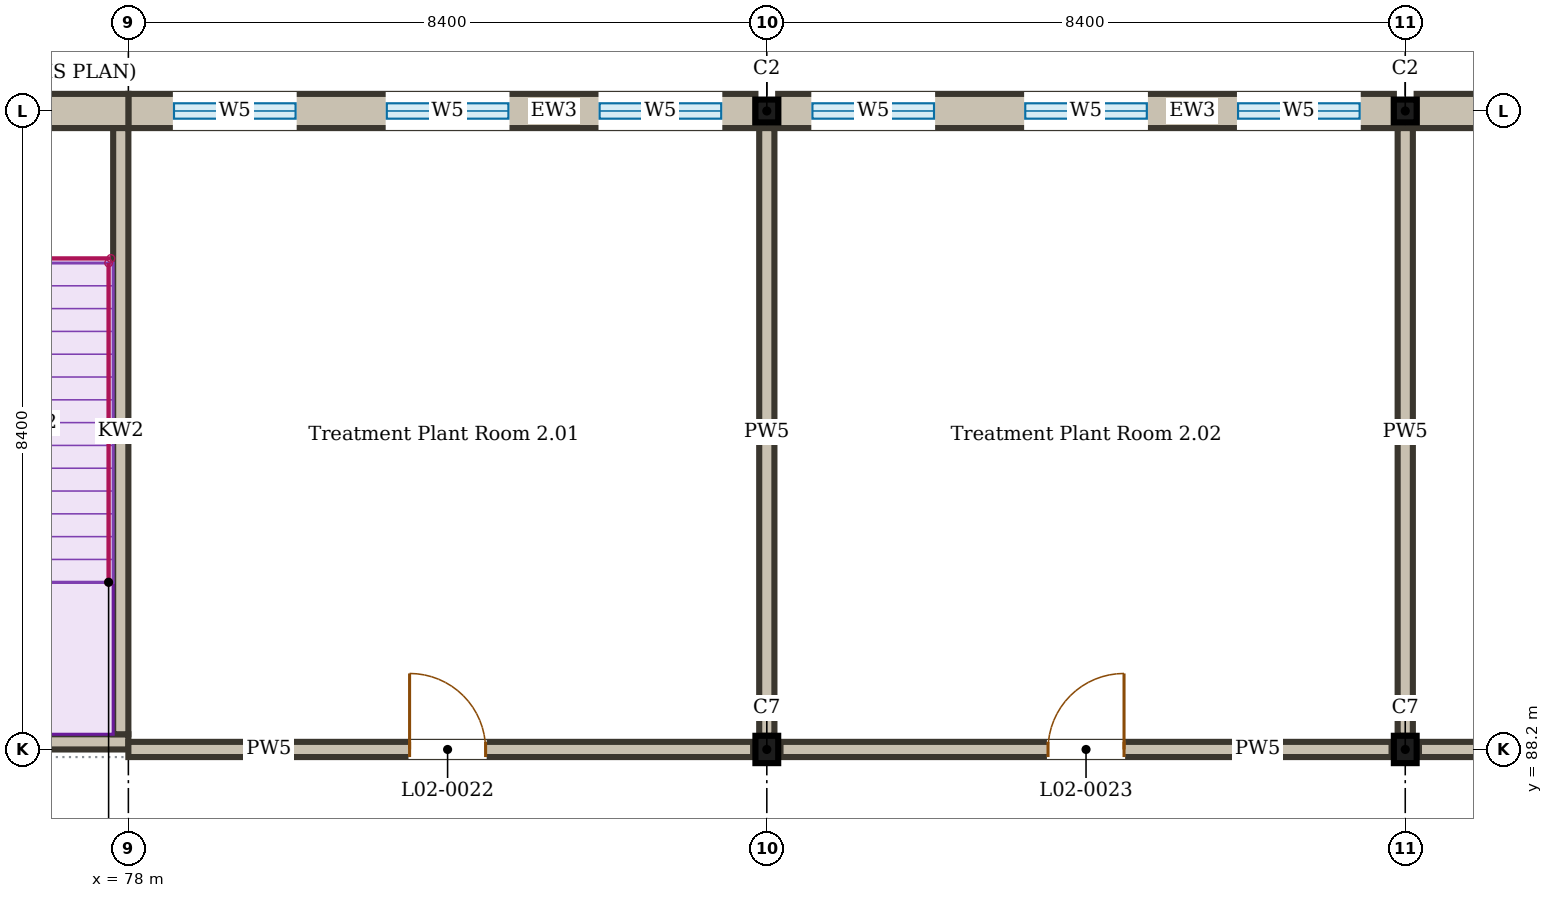
"""IFC4 building model, lengths in metres.
Left out: names, types, materials, properties, quantities, classifications, styles, units other than length and angle.
Written with IfcOpenShell. Run it as: python <this file> out.ifc"""

import sys

from ifc_helpers import new_model, si_unit, direction, frame, frame_2d, origin, origin_2d, place, context, subcontext, project, spatial, rectangle, i_section, extrude, element, fill, save


model = new_model("IFC4")
c1 = context("Model", 3, precision=1e-05, world=origin(), true_north=direction((0.0, 1.0)))
c2 = subcontext(c1, "Body", "Model", "MODEL_VIEW")
j1 = project(units=[si_unit("LENGTHUNIT", "METRE"), si_unit("PLANEANGLEUNIT", "RADIAN")], contexts=[c1])
p1 = place(None, origin())
s1 = spatial("IfcSite", under=j1, at=p1, CompositionType="ELEMENT")
p2 = place(p1, origin())
s2 = spatial("IfcBuilding", under=s1, at=p2, CompositionType="ELEMENT")
p3 = place(p2, frame((0.0, 0.0, 9.0)))
s3 = spatial("IfcBuildingStorey", under=s2, at=p3, CompositionType="ELEMENT", Elevation=9.0)
for number, where, z_axis, x_axis in (
    (1, (86.4, 88.2, 0.0), (0.0, 0.0, 1.0), (1.0, 0.0, 0.0)),
    (2, (94.8, 88.2, 0.0), (0.0, 0.0, 1.0), (1.0, 0.0, 0.0)),
):
    element("IfcColumn", number, at=place(p3, frame(where, z_axis=z_axis, x_axis=x_axis)), inside=s3, PredefinedType="COLUMN", context=c2, shape_type="SweptSolid", body=[
        extrude(i_section(OverallWidth=0.3, OverallDepth=0.36, WebThickness=0.012, FlangeThickness=0.022, FilletRadius=0.027, at=origin_2d()), origin(), (0.0, 0.0, 1.0), 4.5),
    ])
for number, where, z_axis, x_axis in (
    (3, (86.4, 96.6, 0.0), (0.0, 0.0, 1.0), (1.0, 0.0, 0.0)),
    (4, (94.8, 96.6, 0.0), (0.0, 0.0, 1.0), (1.0, 0.0, 0.0)),
):
    element("IfcColumn", number, at=place(p3, frame(where, z_axis=z_axis, x_axis=x_axis)), inside=s3, PredefinedType="COLUMN", context=c2, shape_type="SweptSolid", body=[
        extrude(i_section(OverallWidth=0.3, OverallDepth=0.3, WebThickness=0.011, FlangeThickness=0.019, FilletRadius=0.027, at=origin_2d()), origin(), (0.0, 0.0, 1.0), 4.5),
    ])
p4 = place(p3, frame((78.0, 96.6, 0.0), z_axis=(0.0, 0.0, 1.0), x_axis=(1.0, 0.0, 0.0)))
e5 = element("IfcWall", 5, at=p4, inside=s3, PredefinedType="SOLIDWALL", context=c2, shape_type="SweptSolid", body=[
    extrude(rectangle(XDim=8.25, YDim=0.45, at=frame_2d((4.125, 0.0))), origin(), (0.0, 0.0, 1.0), 3.886),
])
p5 = place(p4, frame((0.6, 0.0, 0.9)))
e6 = element("IfcOpeningElement", 6, at=p5, cuts=e5, PredefinedType="OPENING", context=c2, shape_type="SweptSolid", body=[
    extrude(rectangle(XDim=1.6, YDim=1.2, at=frame_2d((0.8, 0.6))), frame((0.0, 0.235, 0.0), z_axis=(0.0, -1.0, 0.0), x_axis=(1.0, 0.0, 0.0)), (0.0, 0.0, 1.0), 0.47),
])
p6 = place(p4, frame((3.4, 0.0, 0.9)))
e7 = element("IfcOpeningElement", 7, at=p6, cuts=e5, PredefinedType="OPENING", context=c2, shape_type="SweptSolid", body=[
    extrude(rectangle(XDim=1.6, YDim=1.2, at=frame_2d((0.8, 0.6))), frame((0.0, 0.235, 0.0), z_axis=(0.0, -1.0, 0.0), x_axis=(1.0, 0.0, 0.0)), (0.0, 0.0, 1.0), 0.47),
])
p7 = place(p4, frame((6.2, 0.0, 0.9)))
e8 = element("IfcOpeningElement", 8, at=p7, cuts=e5, PredefinedType="OPENING", context=c2, shape_type="SweptSolid", body=[
    extrude(rectangle(XDim=1.6, YDim=1.2, at=frame_2d((0.8, 0.6))), frame((0.0, 0.235, 0.0), z_axis=(0.0, -1.0, 0.0), x_axis=(1.0, 0.0, 0.0)), (0.0, 0.0, 1.0), 0.47),
])
p8 = place(p3, frame((86.55, 96.6, 0.0), z_axis=(0.0, 0.0, 1.0), x_axis=(1.0, 0.0, 0.0)))
e9 = element("IfcWall", 9, at=p8, inside=s3, PredefinedType="SOLIDWALL", context=c2, shape_type="SweptSolid", body=[
    extrude(rectangle(XDim=8.1, YDim=0.45, at=frame_2d((4.05, 0.0))), origin(), (0.0, 0.0, 1.0), 3.886),
])
p9 = place(p8, frame((0.45, 0.0, 0.9)))
e10 = element("IfcOpeningElement", 10, at=p9, cuts=e9, PredefinedType="OPENING", context=c2, shape_type="SweptSolid", body=[
    extrude(rectangle(XDim=1.6, YDim=1.2, at=frame_2d((0.8, 0.6))), frame((0.0, 0.235, 0.0), z_axis=(0.0, -1.0, 0.0), x_axis=(1.0, 0.0, 0.0)), (0.0, 0.0, 1.0), 0.47),
])
p10 = place(p8, frame((3.25, 0.0, 0.9)))
e11 = element("IfcOpeningElement", 11, at=p10, cuts=e9, PredefinedType="OPENING", context=c2, shape_type="SweptSolid", body=[
    extrude(rectangle(XDim=1.6, YDim=1.2, at=frame_2d((0.8, 0.6))), frame((0.0, 0.235, 0.0), z_axis=(0.0, -1.0, 0.0), x_axis=(1.0, 0.0, 0.0)), (0.0, 0.0, 1.0), 0.47),
])
p11 = place(p8, frame((6.05, 0.0, 0.9)))
e12 = element("IfcOpeningElement", 12, at=p11, cuts=e9, PredefinedType="OPENING", context=c2, shape_type="SweptSolid", body=[
    extrude(rectangle(XDim=1.6, YDim=1.2, at=frame_2d((0.8, 0.6))), frame((0.0, 0.235, 0.0), z_axis=(0.0, -1.0, 0.0), x_axis=(1.0, 0.0, 0.0)), (0.0, 0.0, 1.0), 0.47),
])
p12 = place(p3, frame((94.95, 96.6, 0.0), z_axis=(0.0, 0.0, 1.0), x_axis=(1.0, 0.0, 0.0)))
e13 = element("IfcWall", 13, at=p12, inside=s3, PredefinedType="SOLIDWALL", context=c2, shape_type="SweptSolid", body=[
    extrude(rectangle(XDim=8.25, YDim=0.45, at=frame_2d((4.125, 0.0))), origin(), (0.0, 0.0, 1.0), 3.886),
])
p13 = place(p3, frame((78.0, 88.2, 0.0), z_axis=(0.0, 0.0, 1.0), x_axis=(1.0, 0.0, 0.0)))
e14 = element("IfcWall", 14, at=p13, inside=s3, PredefinedType="SOLIDWALL", context=c2, shape_type="SweptSolid", body=[
    extrude(rectangle(XDim=8.22, YDim=0.2, at=frame_2d((4.11, 0.0))), origin(), (0.0, 0.0, 1.0), 3.9),
])
p14 = place(p13, frame((3.7, 0.0, 0.0)))
e15 = element("IfcOpeningElement", 15, at=p14, cuts=e14, PredefinedType="OPENING", context=c2, shape_type="SweptSolid", body=[
    extrude(rectangle(XDim=1.0, YDim=2.1, at=frame_2d((0.5, 1.05))), frame((0.0, 0.11, 0.0), z_axis=(0.0, -1.0, 0.0), x_axis=(1.0, 0.0, 0.0)), (0.0, 0.0, 1.0), 0.22),
])
p15 = place(p3, frame((86.58, 88.2, 0.0), z_axis=(0.0, 0.0, 1.0), x_axis=(1.0, 0.0, 0.0)))
e16 = element("IfcWall", 16, at=p15, inside=s3, PredefinedType="SOLIDWALL", context=c2, shape_type="SweptSolid", body=[
    extrude(rectangle(XDim=8.04, YDim=0.2, at=frame_2d((4.02, 0.0))), origin(), (0.0, 0.0, 1.0), 3.9),
])
p16 = place(p15, frame((3.52, 0.0, 0.0)))
e17 = element("IfcOpeningElement", 17, at=p16, cuts=e16, PredefinedType="OPENING", context=c2, shape_type="SweptSolid", body=[
    extrude(rectangle(XDim=1.0, YDim=2.1, at=frame_2d((0.5, 1.05))), frame((0.0, 0.11, 0.0), z_axis=(0.0, -1.0, 0.0), x_axis=(1.0, 0.0, 0.0)), (0.0, 0.0, 1.0), 0.22),
])
p17 = place(p3, frame((94.98, 88.2, 0.0), z_axis=(0.0, 0.0, 1.0), x_axis=(1.0, 0.0, 0.0)))
e18 = element("IfcWall", 18, at=p17, inside=s3, PredefinedType="SOLIDWALL", context=c2, shape_type="SweptSolid", body=[
    extrude(rectangle(XDim=8.22, YDim=0.2, at=frame_2d((4.11, 0.0))), origin(), (0.0, 0.0, 1.0), 3.9),
])
p18 = place(p17, frame((3.52, 0.0, 0.0)))
e19 = element("IfcOpeningElement", 19, at=p18, cuts=e18, PredefinedType="OPENING", context=c2, shape_type="SweptSolid", body=[
    extrude(rectangle(XDim=1.0, YDim=2.1, at=frame_2d((0.5, 1.05))), frame((0.0, 0.11, 0.0), z_axis=(0.0, -1.0, 0.0), x_axis=(1.0, 0.0, 0.0)), (0.0, 0.0, 1.0), 0.22),
])
for number, where, z_axis, x_axis in (
    (20, (86.4, 88.38, 0.0), (0.0, 0.0, 1.0), (0.0, 1.0, 0.0)),
    (21, (94.8, 88.38, 0.0), (0.0, 0.0, 1.0), (0.0, 1.0, 0.0)),
):
    element("IfcWall", number, at=place(p3, frame(where, z_axis=z_axis, x_axis=x_axis)), inside=s3, PredefinedType="SOLIDWALL", context=c2, shape_type="SweptSolid", body=[
        extrude(rectangle(XDim=7.995, YDim=0.2, at=frame_2d((3.998, 0.0))), origin(), (0.0, 0.0, 1.0), 3.9),
    ])
p19 = place(p3, frame((78.0, 88.3, 0.0), z_axis=(0.0, 0.0, 1.0), x_axis=(-1.0, 0.0, 0.0)))
e22 = element("IfcWall", 22, at=p19, inside=s3, PredefinedType="SOLIDWALL", context=c2, shape_type="SweptSolid", body=[
    extrude(rectangle(XDim=8.4, YDim=0.2, at=frame_2d((4.2, 0.0))), origin(), (0.0, 0.0, 1.0), 4.5),
])
p20 = place(p19, frame((4.725, 0.0, 0.0)))
e23 = element("IfcOpeningElement", 23, at=p20, cuts=e22, PredefinedType="OPENING", context=c2, shape_type="SweptSolid", body=[
    extrude(rectangle(XDim=1.3, YDim=2.1, at=frame_2d((0.65, 1.05))), frame((0.0, 0.11, 0.0), z_axis=(0.0, -1.0, 0.0), x_axis=(1.0, 0.0, 0.0)), (0.0, 0.0, 1.0), 0.22),
])
p21 = place(p3, frame((78.0, 96.6, 0.0), z_axis=(0.0, 0.0, 1.0), x_axis=(-1.0, 0.0, 0.0)))
e24 = element("IfcWall", 24, at=p21, inside=s3, PredefinedType="SOLIDWALL", context=c2, shape_type="SweptSolid", body=[
    extrude(rectangle(XDim=8.4, YDim=0.45, at=frame_2d((4.2, 0.0))), origin(), (0.0, 0.0, 1.0), 4.5),
])
p22 = place(p3, frame((77.9, 88.4, 0.0), z_axis=(0.0, 0.0, 1.0), x_axis=(0.0, 1.0, 0.0)))
e25 = element("IfcWall", 25, at=p22, inside=s3, PredefinedType="SOLIDWALL", context=c2, shape_type="SweptSolid", body=[
    extrude(rectangle(XDim=7.975, YDim=0.2, at=frame_2d((3.988, 0.0))), origin(), (0.0, 0.0, 1.0), 4.5),
])
p23 = place(p5, origin())
e26 = element("IfcWindow", 26, at=p23, inside=s3, PartitioningType="SINGLE_PANEL", PredefinedType="WINDOW", context=c2, shape_type="SweptSolid", body=[
    extrude(rectangle(XDim=1.6, YDim=1.2, at=frame_2d((0.8, 0.6))), frame((0.0, 0.03, 0.0), z_axis=(0.0, -1.0, 0.0), x_axis=(1.0, 0.0, 0.0)), (0.0, 0.0, 1.0), 0.06),
])
fill(e6, e26)
p24 = place(p6, origin())
e27 = element("IfcWindow", 27, at=p24, inside=s3, PartitioningType="SINGLE_PANEL", PredefinedType="WINDOW", context=c2, shape_type="SweptSolid", body=[
    extrude(rectangle(XDim=1.6, YDim=1.2, at=frame_2d((0.8, 0.6))), frame((0.0, 0.03, 0.0), z_axis=(0.0, -1.0, 0.0), x_axis=(1.0, 0.0, 0.0)), (0.0, 0.0, 1.0), 0.06),
])
fill(e7, e27)
p25 = place(p7, origin())
e28 = element("IfcWindow", 28, at=p25, inside=s3, PartitioningType="SINGLE_PANEL", PredefinedType="WINDOW", context=c2, shape_type="SweptSolid", body=[
    extrude(rectangle(XDim=1.6, YDim=1.2, at=frame_2d((0.8, 0.6))), frame((0.0, 0.03, 0.0), z_axis=(0.0, -1.0, 0.0), x_axis=(1.0, 0.0, 0.0)), (0.0, 0.0, 1.0), 0.06),
])
fill(e8, e28)
p26 = place(p9, origin())
e29 = element("IfcWindow", 29, at=p26, inside=s3, PartitioningType="SINGLE_PANEL", PredefinedType="WINDOW", context=c2, shape_type="SweptSolid", body=[
    extrude(rectangle(XDim=1.6, YDim=1.2, at=frame_2d((0.8, 0.6))), frame((0.0, 0.03, 0.0), z_axis=(0.0, -1.0, 0.0), x_axis=(1.0, 0.0, 0.0)), (0.0, 0.0, 1.0), 0.06),
])
fill(e10, e29)
p27 = place(p10, origin())
e30 = element("IfcWindow", 30, at=p27, inside=s3, PartitioningType="SINGLE_PANEL", PredefinedType="WINDOW", context=c2, shape_type="SweptSolid", body=[
    extrude(rectangle(XDim=1.6, YDim=1.2, at=frame_2d((0.8, 0.6))), frame((0.0, 0.03, 0.0), z_axis=(0.0, -1.0, 0.0), x_axis=(1.0, 0.0, 0.0)), (0.0, 0.0, 1.0), 0.06),
])
fill(e11, e30)
p28 = place(p11, origin())
e31 = element("IfcWindow", 31, at=p28, inside=s3, PartitioningType="SINGLE_PANEL", PredefinedType="WINDOW", context=c2, shape_type="SweptSolid", body=[
    extrude(rectangle(XDim=1.6, YDim=1.2, at=frame_2d((0.8, 0.6))), frame((0.0, 0.03, 0.0), z_axis=(0.0, -1.0, 0.0), x_axis=(1.0, 0.0, 0.0)), (0.0, 0.0, 1.0), 0.06),
])
fill(e12, e31)
p29 = place(p14, origin())
e32 = element("IfcDoor", 32, at=p29, inside=s3, OperationType="SINGLE_SWING_LEFT", PredefinedType="DOOR", context=c2, shape_type="SweptSolid", body=[
    extrude(rectangle(XDim=1.0, YDim=2.1, at=frame_2d((0.5, 1.05))), frame((0.0, 0.025, 0.0), z_axis=(0.0, -1.0, 0.0), x_axis=(1.0, 0.0, 0.0)), (0.0, 0.0, 1.0), 0.05),
])
fill(e15, e32)
p30 = place(p16, origin())
e33 = element("IfcDoor", 33, at=p30, inside=s3, OperationType="SINGLE_SWING_RIGHT", PredefinedType="DOOR", context=c2, shape_type="SweptSolid", body=[
    extrude(rectangle(XDim=1.0, YDim=2.1, at=frame_2d((0.5, 1.05))), frame((0.0, 0.025, 0.0), z_axis=(0.0, -1.0, 0.0), x_axis=(1.0, 0.0, 0.0)), (0.0, 0.0, 1.0), 0.05),
])
fill(e17, e33)
save(model, sys.argv[1])
